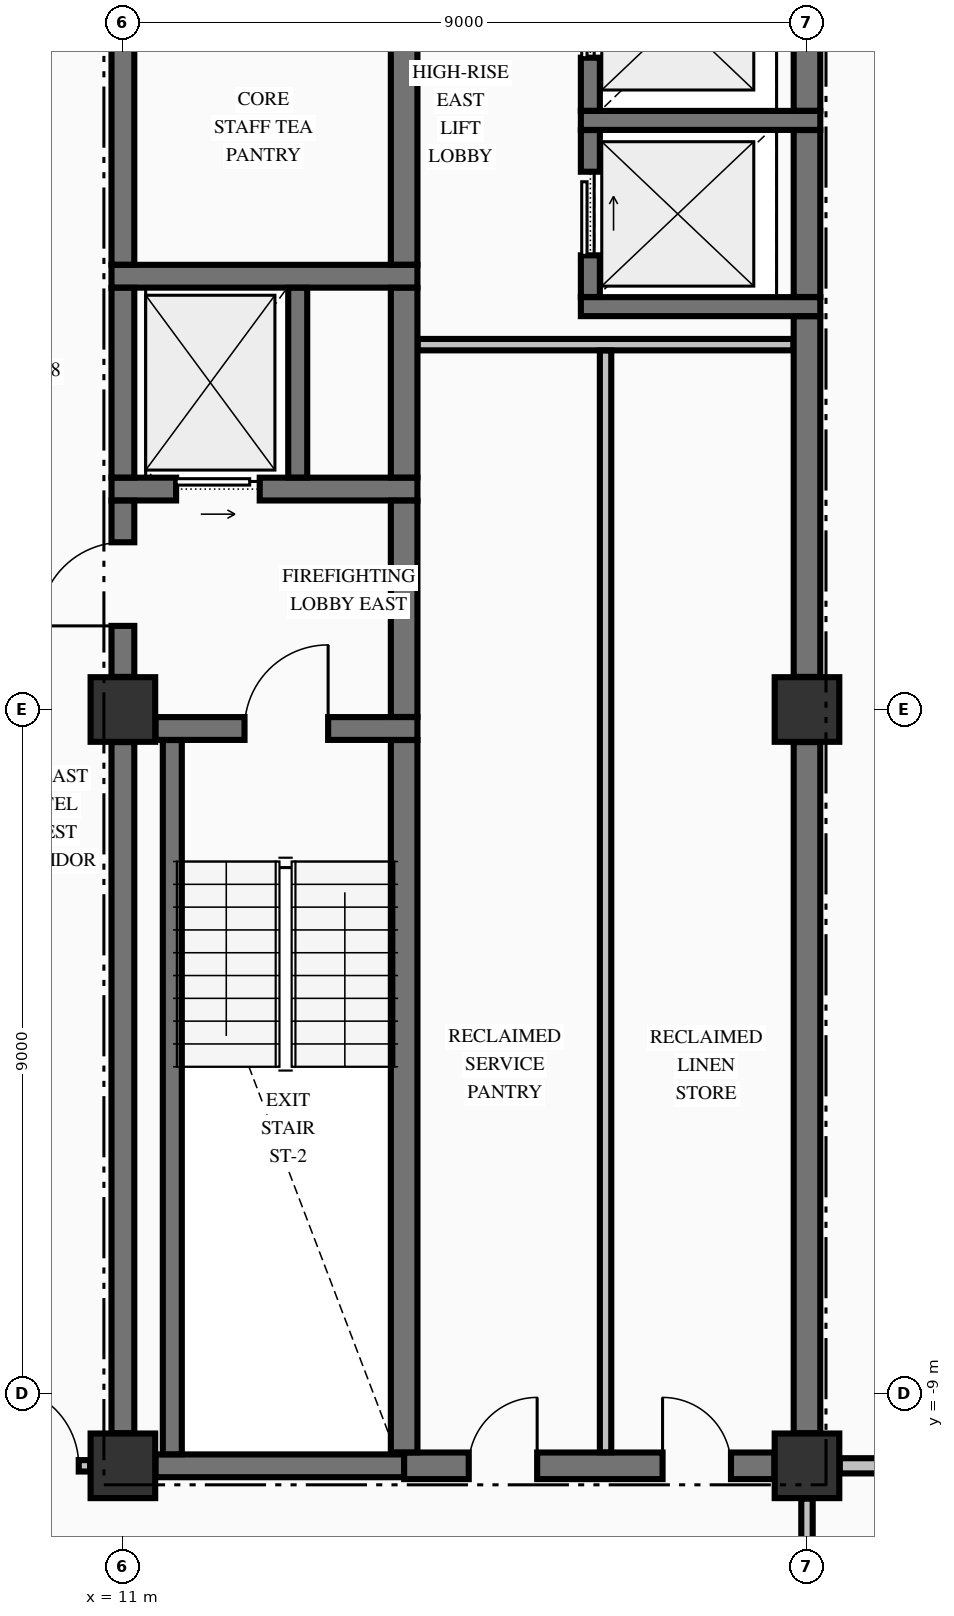
"""IFC4 building model, lengths in metres.
Left out: names, types, materials, properties, quantities, classifications, styles, units other than length and angle.
Written with IfcOpenShell. Run it as: python <this file> out.ifc"""

import sys

from ifc_helpers import new_model, si_unit, direction, frame, frame_2d, origin, origin_2d, place, context, subcontext, project, spatial, rectangle, extrude, element, fill, save


model = new_model("IFC4")
c1 = context("Model", 3, precision=1e-05, world=origin(), true_north=direction((0.0, 1.0)))
c2 = subcontext(c1, "Body", "Model", "MODEL_VIEW")
j1 = project(units=[si_unit("LENGTHUNIT", "METRE"), si_unit("PLANEANGLEUNIT", "RADIAN")], contexts=[c1])
p1 = place(None, origin())
s1 = spatial("IfcSite", under=j1, at=p1, CompositionType="ELEMENT")
p2 = place(p1, origin())
s2 = spatial("IfcBuilding", under=s1, at=p2, CompositionType="ELEMENT")
p3 = place(p2, frame((0.0, 0.0, 169.46)))
s3 = spatial("IfcBuildingStorey", under=s2, at=p3, CompositionType="ELEMENT", Elevation=169.46)
for number, where, z_axis, x_axis in (
    (1, (11.0, -9.95, -0.25), (0.0, 0.0, 1.0), (1.0, 0.0, 0.0)),
    (2, (11.0, 0.0, -0.25), (0.0, 0.0, 1.0), (1.0, 0.0, 0.0)),
    (3, (20.0, -9.95, -0.25), (0.0, 0.0, 1.0), (1.0, 0.0, 0.0)),
    (4, (20.0, 0.0, -0.25), (0.0, 0.0, 1.0), (1.0, 0.0, 0.0)),
):
    element("IfcColumn", number, at=place(p3, frame(where, z_axis=z_axis, x_axis=x_axis)), inside=s3, PredefinedType="COLUMN", context=c2, shape_type="SweptSolid", body=[
        extrude(rectangle(XDim=0.85, YDim=0.85, at=origin_2d()), origin(), (0.0, 0.0, 1.0), 3.4),
    ])
p4 = place(p3, frame((11.429, -9.95, 0.0), z_axis=(0.0, 0.0, 1.0), x_axis=(1.0, 0.0, 0.0)))
e5 = element("IfcWall", 5, at=p4, inside=s3, PredefinedType="SHEAR", context=c2, shape_type="SweptSolid", body=[
    extrude(rectangle(XDim=3.271, YDim=0.3, at=frame_2d((1.635, 0.0))), origin(), (0.0, 0.0, 1.0), 3.15),
])
p5 = place(p3, frame((14.7, -9.95, 0.0), z_axis=(0.0, 0.0, 1.0), x_axis=(1.0, 0.0, 0.0)))
e6 = element("IfcWall", 6, at=p5, inside=s3, PredefinedType="SHEAR", context=c2, shape_type="SweptSolid", body=[
    extrude(rectangle(XDim=4.871, YDim=0.35, at=frame_2d((2.436, 0.0))), origin(), (0.0, 0.0, 1.0), 3.15),
])
p6 = place(p5, frame((0.85, 0.0, 0.0)))
e7 = element("IfcOpeningElement", 7, at=p6, cuts=e6, PredefinedType="OPENING", context=c2, shape_type="SweptSolid", body=[
    extrude(rectangle(XDim=0.9, YDim=2.15, at=frame_2d((0.45, 1.075))), frame((0.0, 0.185, 0.0), z_axis=(0.0, -1.0, 0.0), x_axis=(1.0, 0.0, 0.0)), (0.0, 0.0, 1.0), 0.37),
])
p7 = place(p5, frame((3.4, 0.0, 0.0)))
e8 = element("IfcOpeningElement", 8, at=p7, cuts=e6, PredefinedType="OPENING", context=c2, shape_type="SweptSolid", body=[
    extrude(rectangle(XDim=0.9, YDim=2.15, at=frame_2d((0.45, 1.075))), frame((0.0, 0.185, 0.0), z_axis=(0.0, -1.0, 0.0), x_axis=(1.0, 0.0, 0.0)), (0.0, 0.0, 1.0), 0.37),
])
p8 = place(p3, frame((11.429, -0.25, 0.0), z_axis=(0.0, 0.0, 1.0), x_axis=(1.0, 0.0, 0.0)))
e9 = element("IfcWall", 9, at=p8, inside=s3, PredefinedType="SHEAR", context=c2, shape_type="SweptSolid", body=[
    extrude(rectangle(XDim=3.446, YDim=0.3, at=frame_2d((1.723, 0.0))), origin(), (0.0, 0.0, 1.0), 3.15),
])
p9 = place(p8, frame((1.171, 0.0, 0.0)))
e10 = element("IfcOpeningElement", 10, at=p9, cuts=e9, PredefinedType="OPENING", context=c2, shape_type="SweptSolid", body=[
    extrude(rectangle(XDim=1.1, YDim=2.15, at=frame_2d((0.55, 1.075))), frame((0.0, 0.16, 0.0), z_axis=(0.0, -1.0, 0.0), x_axis=(1.0, 0.0, 0.0)), (0.0, 0.0, 1.0), 0.32),
])
p10 = place(p3, frame((10.85, 2.9, 0.0), z_axis=(0.0, 0.0, 1.0), x_axis=(1.0, 0.0, 0.0)))
e11 = element("IfcWall", 11, at=p10, inside=s3, PredefinedType="SHEAR", context=c2, shape_type="SweptSolid", body=[
    extrude(rectangle(XDim=4.025, YDim=0.3, at=frame_2d((2.012, 0.0))), origin(), (0.0, 0.0, 1.0), 3.15),
])
p11 = place(p10, frame((0.85, 0.0, 0.0)))
e12 = element("IfcOpeningElement", 12, at=p11, cuts=e11, PredefinedType="OPENING", context=c2, shape_type="SweptSolid", body=[
    extrude(rectangle(XDim=1.1, YDim=2.2, at=frame_2d((0.55, 1.1))), frame((0.0, 0.16, 0.0), z_axis=(0.0, -1.0, 0.0), x_axis=(1.0, 0.0, 0.0)), (0.0, 0.0, 1.0), 0.32),
])
p12 = place(p3, frame((17.025, 5.3, 0.0), z_axis=(0.0, 0.0, 1.0), x_axis=(1.0, 0.0, 0.0)))
e13 = element("IfcWall", 13, at=p12, inside=s3, PredefinedType="SOLIDWALL", context=c2, shape_type="SweptSolid", body=[
    extrude(rectangle(XDim=3.15, YDim=0.25, at=frame_2d((1.575, 0.0))), origin(), (0.0, 0.0, 1.0), 3.15),
])
p13 = place(p3, frame((10.85, 5.7, 0.0), z_axis=(0.0, 0.0, 1.0), x_axis=(1.0, 0.0, 0.0)))
e14 = element("IfcWall", 14, at=p13, inside=s3, PredefinedType="SHEAR", context=c2, shape_type="SweptSolid", body=[
    extrude(rectangle(XDim=4.025, YDim=0.3, at=frame_2d((2.012, 0.0))), origin(), (0.0, 0.0, 1.0), 3.15),
])
p14 = place(p3, frame((17.025, 7.75, 0.0), z_axis=(0.0, 0.0, 1.0), x_axis=(1.0, 0.0, 0.0)))
e15 = element("IfcWall", 15, at=p14, inside=s3, PredefinedType="SOLIDWALL", context=c2, shape_type="SweptSolid", body=[
    extrude(rectangle(XDim=3.15, YDim=0.25, at=frame_2d((1.575, 0.0))), origin(), (0.0, 0.0, 1.0), 3.15),
])
p15 = place(p3, frame((-10.569, -9.95, 0.0), z_axis=(0.0, 0.0, 1.0), x_axis=(1.0, 0.0, 0.0)))
e16 = element("IfcWall", 16, at=p15, inside=s3, PredefinedType="PARTITIONING", context=c2, shape_type="SweptSolid", body=[
    extrude(rectangle(XDim=21.138, YDim=0.15, at=frame_2d((10.569, 0.0))), origin(), (0.0, 0.0, 1.0), 3.15),
])
p16 = place(p15, frame((0.15, 0.0, 0.0)))
e17 = element("IfcOpeningElement", 17, at=p16, cuts=e16, PredefinedType="OPENING", context=c2, shape_type="SweptSolid", body=[
    extrude(rectangle(XDim=1.05, YDim=2.15, at=frame_2d((0.525, 1.075))), frame((0.0, 0.085, 0.0), z_axis=(0.0, -1.0, 0.0), x_axis=(1.0, 0.0, 0.0)), (0.0, 0.0, 1.0), 0.17),
])
p17 = place(p15, frame((19.938, 0.0, 0.0)))
e18 = element("IfcOpeningElement", 18, at=p17, cuts=e16, PredefinedType="OPENING", context=c2, shape_type="SweptSolid", body=[
    extrude(rectangle(XDim=1.05, YDim=2.15, at=frame_2d((0.525, 1.075))), frame((0.0, 0.085, 0.0), z_axis=(0.0, -1.0, 0.0), x_axis=(1.0, 0.0, 0.0)), (0.0, 0.0, 1.0), 0.17),
])
p18 = place(p15, frame((12.144, 0.0, 0.0)))
e19 = element("IfcOpeningElement", 19, at=p18, cuts=e16, PredefinedType="OPENING", context=c2, shape_type="SweptSolid", body=[
    extrude(rectangle(XDim=0.95, YDim=2.15, at=frame_2d((0.475, 1.075))), frame((0.0, 0.085, 0.0), z_axis=(0.0, -1.0, 0.0), x_axis=(1.0, 0.0, 0.0)), (0.0, 0.0, 1.0), 0.17),
])
p19 = place(p3, frame((20.431, -9.95, 0.0), z_axis=(0.0, 0.0, 1.0), x_axis=(1.0, 0.0, 0.0)))
e20 = element("IfcWall", 20, at=p19, inside=s3, PredefinedType="PARTITIONING", context=c2, shape_type="SweptSolid", body=[
    extrude(rectangle(XDim=6.404, YDim=0.2, at=frame_2d((3.202, 0.0))), origin(), (0.0, 0.0, 1.0), 3.15),
])
p20 = place(p3, frame((14.878, 4.8, 0.0), z_axis=(0.0, 0.0, 1.0), x_axis=(1.0, 0.0, 0.0)))
e21 = element("IfcWall", 21, at=p20, inside=s3, PredefinedType="PARTITIONING", context=c2, shape_type="SweptSolid", body=[
    extrude(rectangle(XDim=4.944, YDim=0.15, at=frame_2d((2.472, 0.0))), origin(), (0.0, 0.0, 1.0), 3.15),
])
p21 = place(p3, frame((11.0, -9.521, 0.0), z_axis=(0.0, 0.0, 1.0), x_axis=(0.0, 1.0, 0.0)))
e22 = element("IfcWall", 22, at=p21, inside=s3, PredefinedType="SHEAR", context=c2, shape_type="SweptSolid", body=[
    extrude(rectangle(XDim=9.092, YDim=0.3, at=frame_2d((4.546, 0.0))), origin(), (0.0, 0.0, 1.0), 3.15),
])
p22 = place(p3, frame((11.0, 0.429, 0.0), z_axis=(0.0, 0.0, 1.0), x_axis=(0.0, 1.0, 0.0)))
e23 = element("IfcWall", 23, at=p22, inside=s3, PredefinedType="SHEAR", context=c2, shape_type="SweptSolid", body=[
    extrude(rectangle(XDim=2.319, YDim=0.3, at=frame_2d((1.16, 0.0))), origin(), (0.0, 0.0, 1.0), 3.15),
])
p23 = place(p22, frame((0.671, 0.0, 0.0)))
e24 = element("IfcOpeningElement", 24, at=p23, cuts=e23, PredefinedType="OPENING", context=c2, shape_type="SweptSolid", body=[
    extrude(rectangle(XDim=1.1, YDim=2.15, at=frame_2d((0.55, 1.075))), frame((0.0, 0.16, 0.0), z_axis=(0.0, -1.0, 0.0), x_axis=(1.0, 0.0, 0.0)), (0.0, 0.0, 1.0), 0.32),
])
p24 = place(p3, frame((11.0, 3.052, 0.0), z_axis=(0.0, 0.0, 1.0), x_axis=(0.0, 1.0, 0.0)))
e25 = element("IfcWall", 25, at=p24, inside=s3, PredefinedType="SHEAR", context=c2, shape_type="SweptSolid", body=[
    extrude(rectangle(XDim=2.496, YDim=0.3, at=frame_2d((1.248, 0.0))), origin(), (0.0, 0.0, 1.0), 3.15),
])
p25 = place(p3, frame((11.0, 5.852, 0.0), z_axis=(0.0, 0.0, 1.0), x_axis=(0.0, 1.0, 0.0)))
e26 = element("IfcWall", 26, at=p25, inside=s3, PredefinedType="SHEAR", context=c2, shape_type="SweptSolid", body=[
    extrude(rectangle(XDim=4.219, YDim=0.3, at=frame_2d((2.109, 0.0))), origin(), (0.0, 0.0, 1.0), 3.15),
])
p26 = place(p3, frame((11.65, -9.798, 0.0), z_axis=(0.0, 0.0, 1.0), x_axis=(0.0, 1.0, 0.0)))
e27 = element("IfcWall", 27, at=p26, inside=s3, PredefinedType="SOLIDWALL", context=c2, shape_type="SweptSolid", body=[
    extrude(rectangle(XDim=9.396, YDim=0.25, at=frame_2d((4.698, 0.0))), origin(), (0.0, 0.0, 1.0), 3.15),
])
p27 = place(p3, frame((13.3, 3.052, 0.0), z_axis=(0.0, 0.0, 1.0), x_axis=(0.0, 1.0, 0.0)))
e28 = element("IfcWall", 28, at=p27, inside=s3, PredefinedType="SOLIDWALL", context=c2, shape_type="SweptSolid", body=[
    extrude(rectangle(XDim=2.496, YDim=0.25, at=frame_2d((1.248, 0.0))), origin(), (0.0, 0.0, 1.0), 3.15),
])
p28 = place(p3, frame((14.7, -9.773, 0.0), z_axis=(0.0, 0.0, 1.0), x_axis=(0.0, 1.0, 0.0)))
e29 = element("IfcWall", 29, at=p28, inside=s3, PredefinedType="SHEAR", context=c2, shape_type="SweptSolid", body=[
    extrude(rectangle(XDim=9.371, YDim=0.35, at=frame_2d((4.686, 0.0))), origin(), (0.0, 0.0, 1.0), 3.15),
])
p29 = place(p3, frame((14.7, -0.098, 0.0), z_axis=(0.0, 0.0, 1.0), x_axis=(0.0, 1.0, 0.0)))
e30 = element("IfcWall", 30, at=p29, inside=s3, PredefinedType="SHEAR", context=c2, shape_type="SweptSolid", body=[
    extrude(rectangle(XDim=2.846, YDim=0.35, at=frame_2d((1.423, 0.0))), origin(), (0.0, 0.0, 1.0), 3.15),
])
p30 = place(p3, frame((14.7, 3.052, 0.0), z_axis=(0.0, 0.0, 1.0), x_axis=(0.0, 1.0, 0.0)))
e31 = element("IfcWall", 31, at=p30, inside=s3, PredefinedType="SHEAR", context=c2, shape_type="SweptSolid", body=[
    extrude(rectangle(XDim=2.496, YDim=0.35, at=frame_2d((1.248, 0.0))), origin(), (0.0, 0.0, 1.0), 3.15),
])
p31 = place(p3, frame((14.7, 5.852, 0.0), z_axis=(0.0, 0.0, 1.0), x_axis=(0.0, 1.0, 0.0)))
e32 = element("IfcWall", 32, at=p31, inside=s3, PredefinedType="SHEAR", context=c2, shape_type="SweptSolid", body=[
    extrude(rectangle(XDim=4.471, YDim=0.35, at=frame_2d((2.235, 0.0))), origin(), (0.0, 0.0, 1.0), 3.15),
])
p32 = place(p3, frame((17.15, 5.427, 0.0), z_axis=(0.0, 0.0, 1.0), x_axis=(0.0, 1.0, 0.0)))
e33 = element("IfcWall", 33, at=p32, inside=s3, PredefinedType="SOLIDWALL", context=c2, shape_type="SweptSolid", body=[
    extrude(rectangle(XDim=2.196, YDim=0.25, at=frame_2d((1.098, 0.0))), origin(), (0.0, 0.0, 1.0), 3.15),
])
p33 = place(p32, frame((0.548, 0.0, 0.0)))
e34 = element("IfcOpeningElement", 34, at=p33, cuts=e33, PredefinedType="OPENING", context=c2, shape_type="SweptSolid", body=[
    extrude(rectangle(XDim=1.1, YDim=2.2, at=frame_2d((0.55, 1.1))), frame((0.0, 0.135, 0.0), z_axis=(0.0, -1.0, 0.0), x_axis=(1.0, 0.0, 0.0)), (0.0, 0.0, 1.0), 0.27),
])
p34 = place(p3, frame((17.15, 7.877, 0.0), z_axis=(0.0, 0.0, 1.0), x_axis=(0.0, 1.0, 0.0)))
e35 = element("IfcWall", 35, at=p34, inside=s3, PredefinedType="SOLIDWALL", context=c2, shape_type="SweptSolid", body=[
    extrude(rectangle(XDim=2.446, YDim=0.25, at=frame_2d((1.223, 0.0))), origin(), (0.0, 0.0, 1.0), 3.15),
])
p35 = place(p34, frame((0.698, 0.0, 0.0)))
e36 = element("IfcOpeningElement", 36, at=p35, cuts=e35, PredefinedType="OPENING", context=c2, shape_type="SweptSolid", body=[
    extrude(rectangle(XDim=1.1, YDim=2.2, at=frame_2d((0.55, 1.1))), frame((0.0, 0.135, 0.0), z_axis=(0.0, -1.0, 0.0), x_axis=(1.0, 0.0, 0.0)), (0.0, 0.0, 1.0), 0.27),
])
p36 = place(p3, frame((20.0, -9.521, 0.0), z_axis=(0.0, 0.0, 1.0), x_axis=(0.0, 1.0, 0.0)))
e37 = element("IfcWall", 37, at=p36, inside=s3, PredefinedType="SHEAR", context=c2, shape_type="SweptSolid", body=[
    extrude(rectangle(XDim=9.092, YDim=0.35, at=frame_2d((4.546, 0.0))), origin(), (0.0, 0.0, 1.0), 3.15),
])
p37 = place(p3, frame((20.0, 0.429, 0.0), z_axis=(0.0, 0.0, 1.0), x_axis=(0.0, 1.0, 0.0)))
e38 = element("IfcWall", 38, at=p37, inside=s3, PredefinedType="SHEAR", context=c2, shape_type="SweptSolid", body=[
    extrude(rectangle(XDim=4.744, YDim=0.35, at=frame_2d((2.372, 0.0))), origin(), (0.0, 0.0, 1.0), 3.15),
])
p38 = place(p3, frame((20.0, 5.427, 0.0), z_axis=(0.0, 0.0, 1.0), x_axis=(0.0, 1.0, 0.0)))
e39 = element("IfcWall", 39, at=p38, inside=s3, PredefinedType="SHEAR", context=c2, shape_type="SweptSolid", body=[
    extrude(rectangle(XDim=2.196, YDim=0.35, at=frame_2d((1.098, 0.0))), origin(), (0.0, 0.0, 1.0), 3.15),
])
p39 = place(p3, frame((20.0, 7.877, 0.0), z_axis=(0.0, 0.0, 1.0), x_axis=(0.0, 1.0, 0.0)))
e40 = element("IfcWall", 40, at=p39, inside=s3, PredefinedType="SHEAR", context=c2, shape_type="SweptSolid", body=[
    extrude(rectangle(XDim=2.194, YDim=0.35, at=frame_2d((1.097, 0.0))), origin(), (0.0, 0.0, 1.0), 3.15),
])
p40 = place(p3, frame((17.35, -9.772, 0.0), z_axis=(0.0, 0.0, 1.0), x_axis=(0.0, 1.0, 0.0)))
e41 = element("IfcWall", 41, at=p40, inside=s3, PredefinedType="PARTITIONING", context=c2, shape_type="SweptSolid", body=[
    extrude(rectangle(XDim=14.494, YDim=0.15, at=frame_2d((7.247, 0.0))), origin(), (0.0, 0.0, 1.0), 3.15),
])
p41 = place(p3, frame((20.0, -12.697, 0.0), z_axis=(0.0, 0.0, 1.0), x_axis=(0.0, 1.0, 0.0)))
e42 = element("IfcWall", 42, at=p41, inside=s3, PredefinedType="PARTITIONING", context=c2, shape_type="SweptSolid", body=[
    extrude(rectangle(XDim=2.316, YDim=0.15, at=frame_2d((1.158, 0.0))), origin(), (0.0, 0.0, 1.0), 2.342),
])
p42 = place(p9, origin())
e43 = element("IfcDoor", 43, at=p42, inside=s3, OperationType="SINGLE_SWING_RIGHT", PredefinedType="DOOR", context=c2, shape_type="SweptSolid", body=[
    extrude(rectangle(XDim=1.1, YDim=2.15, at=frame_2d((0.55, 1.075))), frame((0.0, 0.025, 0.0), z_axis=(0.0, -1.0, 0.0), x_axis=(1.0, 0.0, 0.0)), (0.0, 0.0, 1.0), 0.05),
])
fill(e10, e43)
p43 = place(p23, origin())
e44 = element("IfcDoor", 44, at=p43, inside=s3, OperationType="SINGLE_SWING_LEFT", PredefinedType="DOOR", context=c2, shape_type="SweptSolid", body=[
    extrude(rectangle(XDim=1.1, YDim=2.15, at=frame_2d((0.55, 1.075))), frame((0.0, 0.025, 0.0), z_axis=(0.0, -1.0, 0.0), x_axis=(1.0, 0.0, 0.0)), (0.0, 0.0, 1.0), 0.05),
])
fill(e24, e44)
p44 = place(p11, origin())
e45 = element("IfcDoor", 45, at=p44, inside=s3, OperationType="SLIDING_TO_RIGHT", PredefinedType="DOOR", context=c2, shape_type="SweptSolid", body=[
    extrude(rectangle(XDim=1.1, YDim=2.2, at=frame_2d((0.55, 1.1))), frame((0.0, 0.025, 0.0), z_axis=(0.0, -1.0, 0.0), x_axis=(1.0, 0.0, 0.0)), (0.0, 0.0, 1.0), 0.05),
])
fill(e12, e45)
p45 = place(p33, origin())
e46 = element("IfcDoor", 46, at=p45, inside=s3, OperationType="SLIDING_TO_RIGHT", PredefinedType="DOOR", context=c2, shape_type="SweptSolid", body=[
    extrude(rectangle(XDim=1.1, YDim=2.2, at=frame_2d((0.55, 1.1))), frame((0.0, 0.025, 0.0), z_axis=(0.0, -1.0, 0.0), x_axis=(1.0, 0.0, 0.0)), (0.0, 0.0, 1.0), 0.05),
])
fill(e34, e46)
p46 = place(p35, origin())
e47 = element("IfcDoor", 47, at=p46, inside=s3, OperationType="SLIDING_TO_RIGHT", PredefinedType="DOOR", context=c2, shape_type="SweptSolid", body=[
    extrude(rectangle(XDim=1.1, YDim=2.2, at=frame_2d((0.55, 1.1))), frame((0.0, 0.025, 0.0), z_axis=(0.0, -1.0, 0.0), x_axis=(1.0, 0.0, 0.0)), (0.0, 0.0, 1.0), 0.05),
])
fill(e36, e47)
p47 = place(p6, origin())
e48 = element("IfcDoor", 48, at=p47, inside=s3, OperationType="SINGLE_SWING_RIGHT", PredefinedType="DOOR", context=c2, shape_type="SweptSolid", body=[
    extrude(rectangle(XDim=0.9, YDim=2.15, at=frame_2d((0.45, 1.075))), frame((0.0, 0.025, 0.0), z_axis=(0.0, -1.0, 0.0), x_axis=(1.0, 0.0, 0.0)), (0.0, 0.0, 1.0), 0.05),
])
fill(e7, e48)
p48 = place(p7, origin())
e49 = element("IfcDoor", 49, at=p48, inside=s3, OperationType="SINGLE_SWING_LEFT", PredefinedType="DOOR", context=c2, shape_type="SweptSolid", body=[
    extrude(rectangle(XDim=0.9, YDim=2.15, at=frame_2d((0.45, 1.075))), frame((0.0, 0.025, 0.0), z_axis=(0.0, -1.0, 0.0), x_axis=(1.0, 0.0, 0.0)), (0.0, 0.0, 1.0), 0.05),
])
fill(e8, e49)
p49 = place(p17, origin())
e50 = element("IfcDoor", 50, at=p49, inside=s3, OperationType="SINGLE_SWING_LEFT", PredefinedType="DOOR", context=c2, shape_type="SweptSolid", body=[
    extrude(rectangle(XDim=1.05, YDim=2.15, at=frame_2d((0.525, 1.075))), frame((0.0, 0.025, 0.0), z_axis=(0.0, -1.0, 0.0), x_axis=(1.0, 0.0, 0.0)), (0.0, 0.0, 1.0), 0.05),
])
fill(e18, e50)
save(model, sys.argv[1])
